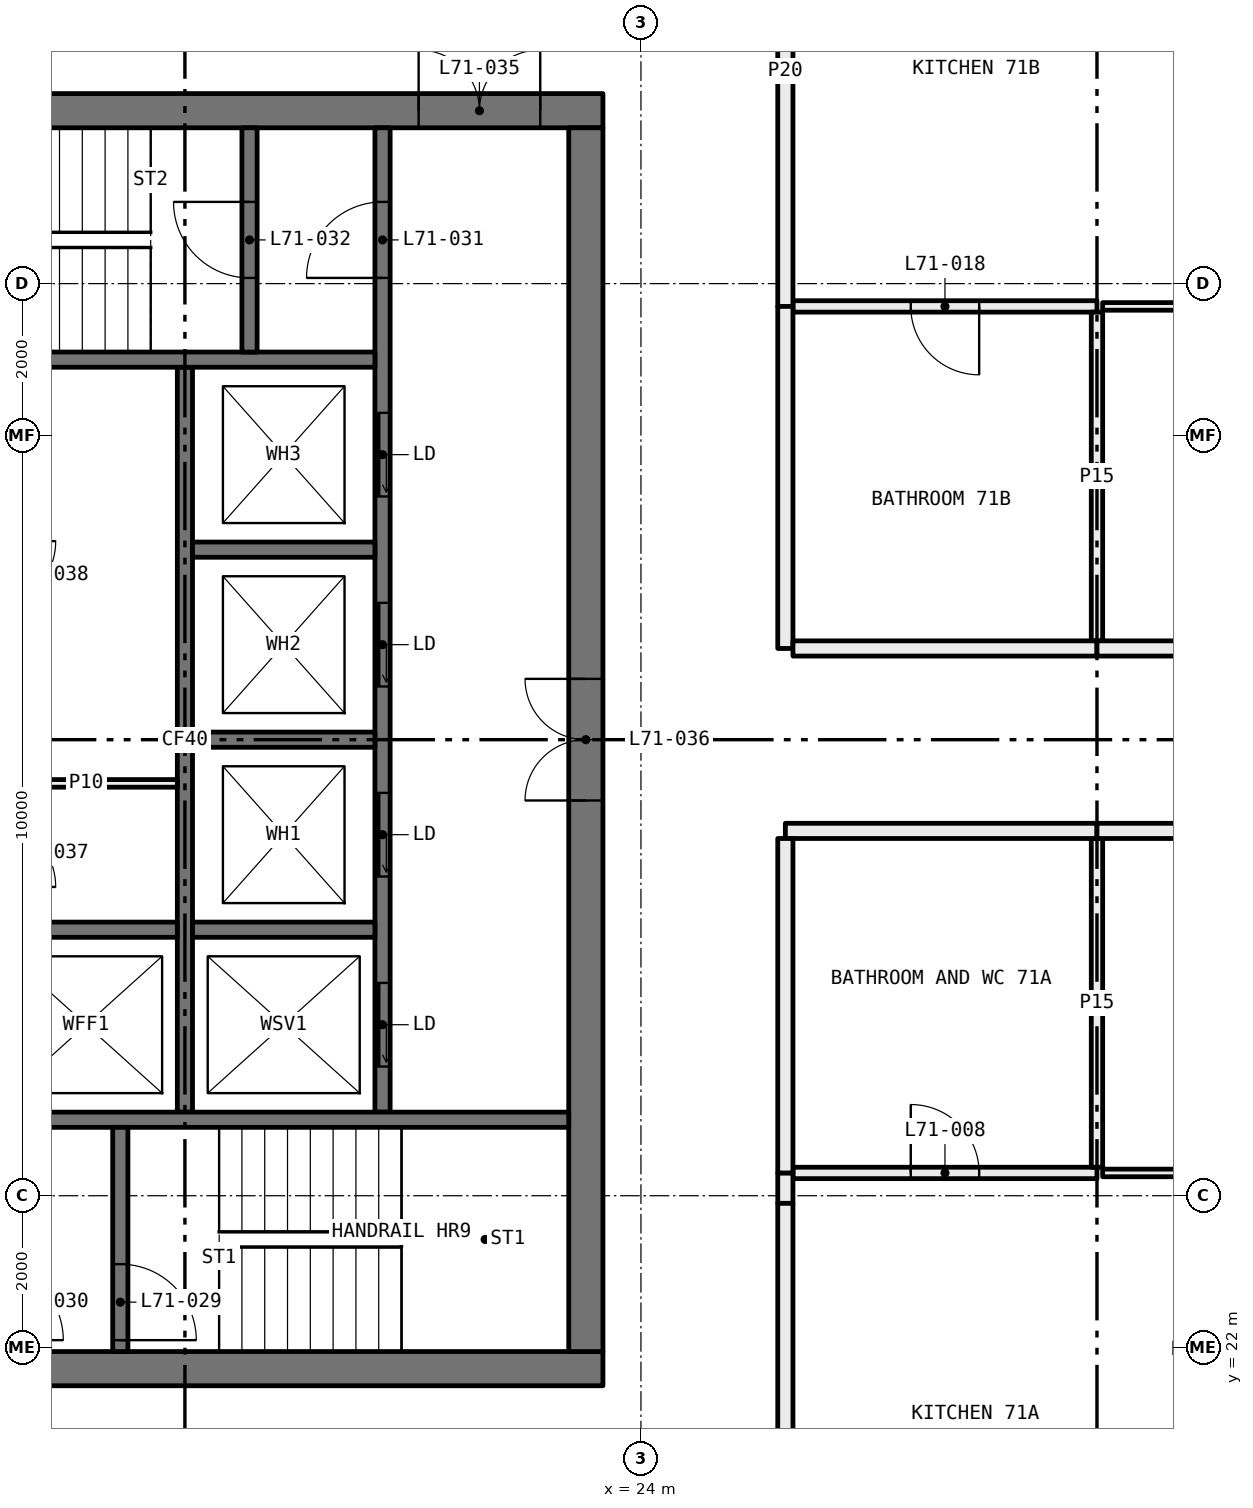
"""IFC4 building model, lengths in metres.
Left out: names, types, materials, properties, quantities, classifications, styles, units other than length and angle.
Written with IfcOpenShell. Run it as: python <this file> out.ifc"""

import sys

from ifc_helpers import new_model, si_unit, direction, frame, frame_2d, origin, place, context, subcontext, project, spatial, rectangle, extrude, element, fill, save


model = new_model("IFC4")
c1 = context("Model", 3, precision=1e-05, world=origin(), true_north=direction((0.0, 1.0)))
c2 = subcontext(c1, "Body", "Model", "MODEL_VIEW")
j1 = project(units=[si_unit("LENGTHUNIT", "METRE"), si_unit("PLANEANGLEUNIT", "RADIAN")], contexts=[c1])
p1 = place(None, origin())
s1 = spatial("IfcSite", under=j1, at=p1, CompositionType="ELEMENT")
p2 = place(p1, origin())
s2 = spatial("IfcBuilding", under=s1, at=p2, CompositionType="ELEMENT")
p3 = place(p2, frame((0.0, 0.0, 262.8)))
s3 = spatial("IfcBuildingStorey", under=s2, at=p3, CompositionType="ELEMENT", Elevation=262.8)
p4 = place(p3, frame((30.0, 24.3, 0.0), z_axis=(0.0, 0.0, 1.0), x_axis=(-1.0, 0.0, 0.0)))
e1 = element("IfcWall", 1, at=p4, inside=s3, PredefinedType="PARTITIONING", context=c2, shape_type="SweptSolid", body=[
    extrude(rectangle(XDim=4.0, YDim=0.15, at=frame_2d((2.0, 0.0))), origin(), (0.0, 0.0, 1.0), 3.05),
])
p5 = place(p4, frame((1.55, 0.0, 0.0)))
e2 = element("IfcOpeningElement", 2, at=p5, cuts=e1, PredefinedType="OPENING", context=c2, shape_type="SweptSolid", body=[
    extrude(rectangle(XDim=0.9, YDim=2.1, at=frame_2d((0.45, 1.05))), frame((0.0, 0.085, 0.0), z_axis=(0.0, -1.0, 0.0), x_axis=(1.0, 0.0, 0.0)), (0.0, 0.0, 1.0), 0.17),
])
p6 = place(p3, frame((31.45, 24.3, 0.0), z_axis=(0.0, 0.0, 1.0), x_axis=(-1.0, 0.0, 0.0)))
e3 = element("IfcWall", 3, at=p6, inside=s3, PredefinedType="PARTITIONING", context=c2, shape_type="SweptSolid", body=[
    extrude(rectangle(XDim=1.375, YDim=0.1, at=frame_2d((0.688, 0.0))), origin(), (0.0, 0.0, 1.0), 3.05),
])
p7 = place(p3, frame((25.9, 24.3, 0.0), z_axis=(0.0, 0.0, 1.0), x_axis=(0.0, -1.0, 0.0)))
e4 = element("IfcWall", 4, at=p7, inside=s3, PredefinedType="PARTITIONING", context=c2, shape_type="SweptSolid", body=[
    extrude(rectangle(XDim=0.4, YDim=0.2, at=frame_2d((0.2, 0.0))), origin(), (0.0, 0.0, 1.0), 2.45),
])
p8 = place(p3, frame((25.9, 23.9, 0.0), z_axis=(0.0, 0.0, 1.0), x_axis=(0.0, -1.0, 0.0)))
e5 = element("IfcWall", 5, at=p8, inside=s3, PredefinedType="PARTITIONING", context=c2, shape_type="SweptSolid", body=[
    extrude(rectangle(XDim=5.8, YDim=0.2, at=frame_2d((2.9, 0.0))), origin(), (0.0, 0.0, 1.0), 3.05),
])
p9 = place(p3, frame((30.0, 24.375, 0.0), z_axis=(0.0, 0.0, 1.0), x_axis=(0.0, 1.0, 0.0)))
e6 = element("IfcWall", 6, at=p9, inside=s3, PredefinedType="PARTITIONING", context=c2, shape_type="SweptSolid", body=[
    extrude(rectangle(XDim=4.325, YDim=0.15, at=frame_2d((2.163, 0.0))), origin(), (0.0, 0.0, 1.0), 3.05),
])
p10 = place(p3, frame((30.0, 28.8, 0.0), z_axis=(0.0, 0.0, 1.0), x_axis=(-1.0, 0.0, 0.0)))
e7 = element("IfcWall", 7, at=p10, inside=s3, PredefinedType="PARTITIONING", context=c2, shape_type="SweptSolid", body=[
    extrude(rectangle(XDim=4.1, YDim=0.2, at=frame_2d((2.05, 0.0))), origin(), (0.0, 0.0, 1.0), 3.05),
])
p11 = place(p3, frame((25.9, 28.7, 0.0), z_axis=(0.0, 0.0, 1.0), x_axis=(0.0, -1.0, 0.0)))
e8 = element("IfcWall", 8, at=p11, inside=s3, PredefinedType="PARTITIONING", context=c2, shape_type="SweptSolid", body=[
    extrude(rectangle(XDim=4.4, YDim=0.2, at=frame_2d((2.2, 0.0))), origin(), (0.0, 0.0, 1.0), 3.05),
])
p12 = place(p3, frame((35.9, 28.8, 0.0), z_axis=(0.0, 0.0, 1.0), x_axis=(-1.0, 0.0, 0.0)))
e9 = element("IfcWall", 9, at=p12, inside=s3, PredefinedType="PARTITIONING", context=c2, shape_type="SweptSolid", body=[
    extrude(rectangle(XDim=5.9, YDim=0.2, at=frame_2d((2.95, 0.0))), origin(), (0.0, 0.0, 1.0), 3.05),
])
p13 = place(p3, frame((26.0, 35.7, 0.0), z_axis=(0.0, 0.0, 1.0), x_axis=(1.0, 0.0, 0.0)))
e10 = element("IfcWall", 10, at=p13, inside=s3, PredefinedType="PARTITIONING", context=c2, shape_type="SweptSolid", body=[
    extrude(rectangle(XDim=4.0, YDim=0.15, at=frame_2d((2.0, 0.0))), origin(), (0.0, 0.0, 1.0), 3.05),
])
p14 = place(p13, frame((1.55, 0.0, 0.0)))
e11 = element("IfcOpeningElement", 11, at=p14, cuts=e10, PredefinedType="OPENING", context=c2, shape_type="SweptSolid", body=[
    extrude(rectangle(XDim=0.9, YDim=2.1, at=frame_2d((0.45, 1.05))), frame((0.0, 0.085, 0.0), z_axis=(0.0, -1.0, 0.0), x_axis=(1.0, 0.0, 0.0)), (0.0, 0.0, 1.0), 0.17),
])
p15 = place(p3, frame((30.075, 35.7, 0.0), z_axis=(0.0, 0.0, 1.0), x_axis=(1.0, 0.0, 0.0)))
e12 = element("IfcWall", 12, at=p15, inside=s3, PredefinedType="PARTITIONING", context=c2, shape_type="SweptSolid", body=[
    extrude(rectangle(XDim=1.375, YDim=0.1, at=frame_2d((0.688, 0.0))), origin(), (0.0, 0.0, 1.0), 3.05),
])
p16 = place(p3, frame((25.9, 41.9, 0.0), z_axis=(0.0, 0.0, 1.0), x_axis=(0.0, -1.0, 0.0)))
e13 = element("IfcWall", 13, at=p16, inside=s3, PredefinedType="PARTITIONING", context=c2, shape_type="SweptSolid", body=[
    extrude(rectangle(XDim=6.2, YDim=0.2, at=frame_2d((3.1, 0.0))), origin(), (0.0, 0.0, 1.0), 2.45),
])
p17 = place(p3, frame((30.0, 31.3, 0.0), z_axis=(0.0, 0.0, 1.0), x_axis=(0.0, 1.0, 0.0)))
e14 = element("IfcWall", 14, at=p17, inside=s3, PredefinedType="PARTITIONING", context=c2, shape_type="SweptSolid", body=[
    extrude(rectangle(XDim=4.325, YDim=0.15, at=frame_2d((2.163, 0.0))), origin(), (0.0, 0.0, 1.0), 3.05),
])
p18 = place(p3, frame((25.9, 35.7, 0.0), z_axis=(0.0, 0.0, 1.0), x_axis=(0.0, -1.0, 0.0)))
e15 = element("IfcWall", 15, at=p18, inside=s3, PredefinedType="PARTITIONING", context=c2, shape_type="SweptSolid", body=[
    extrude(rectangle(XDim=4.5, YDim=0.2, at=frame_2d((2.25, 0.0))), origin(), (0.0, 0.0, 1.0), 3.05),
])
p19 = place(p3, frame((26.0, 31.2, 0.0), z_axis=(0.0, 0.0, 1.0), x_axis=(1.0, 0.0, 0.0)))
e16 = element("IfcWall", 16, at=p19, inside=s3, PredefinedType="PARTITIONING", context=c2, shape_type="SweptSolid", body=[
    extrude(rectangle(XDim=4.0, YDim=0.2, at=frame_2d((2.0, 0.0))), origin(), (0.0, 0.0, 1.0), 3.05),
])
p20 = place(p3, frame((30.0, 31.2, 0.0), z_axis=(0.0, 0.0, 1.0), x_axis=(1.0, 0.0, 0.0)))
e17 = element("IfcWall", 17, at=p20, inside=s3, PredefinedType="PARTITIONING", context=c2, shape_type="SweptSolid", body=[
    extrude(rectangle(XDim=6.1, YDim=0.2, at=frame_2d((3.05, 0.0))), origin(), (0.0, 0.0, 1.0), 2.45),
])
p21 = place(p3, frame((12.5, 21.725, 0.0), z_axis=(0.0, 0.0, 1.0), x_axis=(1.0, 0.0, 0.0)))
e18 = element("IfcWall", 18, at=p21, inside=s3, PredefinedType="SHEAR", context=c2, shape_type="SweptSolid", body=[
    extrude(rectangle(XDim=11.0, YDim=0.45, at=frame_2d((5.5, 0.0))), origin(), (0.0, 0.0, 1.0), 3.05),
])
p22 = place(p21, frame((1.125, 0.0, 0.0)))
e19 = element("IfcOpeningElement", 19, at=p22, cuts=e18, PredefinedType="OPENING", context=c2, shape_type="SweptSolid", body=[
    extrude(rectangle(XDim=1.0, YDim=2.1, at=frame_2d((0.5, 1.05))), frame((0.0, 0.235, 0.0), z_axis=(0.0, -1.0, 0.0), x_axis=(1.0, 0.0, 0.0)), (0.0, 0.0, 1.0), 0.47),
])
p23 = place(p3, frame((12.5, 38.275, 0.0), z_axis=(0.0, 0.0, 1.0), x_axis=(1.0, 0.0, 0.0)))
e20 = element("IfcWall", 20, at=p23, inside=s3, PredefinedType="SHEAR", context=c2, shape_type="SweptSolid", body=[
    extrude(rectangle(XDim=11.0, YDim=0.45, at=frame_2d((5.5, 0.0))), origin(), (0.0, 0.0, 1.0), 3.05),
])
p24 = place(p23, frame((8.575, 0.0, 0.0)))
e21 = element("IfcOpeningElement", 21, at=p24, cuts=e20, PredefinedType="OPENING", context=c2, shape_type="SweptSolid", body=[
    extrude(rectangle(XDim=1.6, YDim=2.1, at=frame_2d((0.8, 1.05))), frame((0.0, 0.235, 0.0), z_axis=(0.0, -1.0, 0.0), x_axis=(1.0, 0.0, 0.0)), (0.0, 0.0, 1.0), 0.47),
])
p25 = place(p3, frame((23.275, 21.95, 0.0), z_axis=(0.0, 0.0, 1.0), x_axis=(0.0, 1.0, 0.0)))
e22 = element("IfcWall", 22, at=p25, inside=s3, PredefinedType="SHEAR", context=c2, shape_type="SweptSolid", body=[
    extrude(rectangle(XDim=16.1, YDim=0.45, at=frame_2d((8.05, 0.0))), origin(), (0.0, 0.0, 1.0), 3.05),
])
p26 = place(p25, frame((7.25, 0.0, 0.0)))
e23 = element("IfcOpeningElement", 23, at=p26, cuts=e22, PredefinedType="OPENING", context=c2, shape_type="SweptSolid", body=[
    extrude(rectangle(XDim=1.6, YDim=2.1, at=frame_2d((0.8, 1.05))), frame((0.0, 0.235, 0.0), z_axis=(0.0, -1.0, 0.0), x_axis=(1.0, 0.0, 0.0)), (0.0, 0.0, 1.0), 0.47),
])
p27 = place(p3, frame((20.6, 25.1, 0.0), z_axis=(0.0, 0.0, 1.0), x_axis=(0.0, 1.0, 0.0)))
e24 = element("IfcWall", 24, at=p27, inside=s3, PredefinedType="SOLIDWALL", context=c2, shape_type="SweptSolid", body=[
    extrude(rectangle(XDim=12.95, YDim=0.2, at=frame_2d((6.475, 0.0))), origin(), (0.0, 0.0, 1.0), 3.05),
])
p28 = place(p27, frame((0.6, 0.0, 0.0)))
e25 = element("IfcOpeningElement", 25, at=p28, cuts=e24, PredefinedType="OPENING", context=c2, shape_type="SweptSolid", body=[
    extrude(rectangle(XDim=1.1, YDim=2.1, at=frame_2d((0.55, 1.05))), frame((0.0, 0.11, 0.0), z_axis=(0.0, -1.0, 0.0), x_axis=(1.0, 0.0, 0.0)), (0.0, 0.0, 1.0), 0.22),
])
p29 = place(p27, frame((3.1, 0.0, 0.0)))
e26 = element("IfcOpeningElement", 26, at=p29, cuts=e24, PredefinedType="OPENING", context=c2, shape_type="SweptSolid", body=[
    extrude(rectangle(XDim=1.1, YDim=2.1, at=frame_2d((0.55, 1.05))), frame((0.0, 0.11, 0.0), z_axis=(0.0, -1.0, 0.0), x_axis=(1.0, 0.0, 0.0)), (0.0, 0.0, 1.0), 0.22),
])
p30 = place(p27, frame((5.6, 0.0, 0.0)))
e27 = element("IfcOpeningElement", 27, at=p30, cuts=e24, PredefinedType="OPENING", context=c2, shape_type="SweptSolid", body=[
    extrude(rectangle(XDim=1.1, YDim=2.1, at=frame_2d((0.55, 1.05))), frame((0.0, 0.11, 0.0), z_axis=(0.0, -1.0, 0.0), x_axis=(1.0, 0.0, 0.0)), (0.0, 0.0, 1.0), 0.22),
])
p31 = place(p27, frame((8.1, 0.0, 0.0)))
e28 = element("IfcOpeningElement", 28, at=p31, cuts=e24, PredefinedType="OPENING", context=c2, shape_type="SweptSolid", body=[
    extrude(rectangle(XDim=1.1, YDim=2.1, at=frame_2d((0.55, 1.05))), frame((0.0, 0.11, 0.0), z_axis=(0.0, -1.0, 0.0), x_axis=(1.0, 0.0, 0.0)), (0.0, 0.0, 1.0), 0.22),
])
p32 = place(p27, frame((10.975, 0.0, 0.0)))
e29 = element("IfcOpeningElement", 29, at=p32, cuts=e24, PredefinedType="OPENING", context=c2, shape_type="SweptSolid", body=[
    extrude(rectangle(XDim=1.0, YDim=2.1, at=frame_2d((0.5, 1.05))), frame((0.0, 0.11, 0.0), z_axis=(0.0, -1.0, 0.0), x_axis=(1.0, 0.0, 0.0)), (0.0, 0.0, 1.0), 0.22),
])
p33 = place(p3, frame((18.0, 25.1, 0.0), z_axis=(0.0, 0.0, 1.0), x_axis=(0.0, 1.0, 0.0)))
e30 = element("IfcWall", 30, at=p33, inside=s3, PredefinedType="SOLIDWALL", context=c2, shape_type="SweptSolid", body=[
    extrude(rectangle(XDim=9.8, YDim=0.2, at=frame_2d((4.9, 0.0))), origin(), (0.0, 0.0, 1.0), 3.05),
])
for number, where, z_axis, x_axis in (
    (31, (15.5, 25.0, 0.0), (0.0, 0.0, 1.0), (1.0, 0.0, 0.0)),
    (32, (12.95, 35.0, 0.0), (0.0, 0.0, 1.0), (1.0, 0.0, 0.0)),
):
    element("IfcWall", number, at=place(p3, frame(where, z_axis=z_axis, x_axis=x_axis)), inside=s3, PredefinedType="SOLIDWALL", context=c2, shape_type="SweptSolid", body=[
        extrude(rectangle(XDim=7.55, YDim=0.2, at=frame_2d((3.775, 0.0))), origin(), (0.0, 0.0, 1.0), 3.05),
    ])
p34 = place(p3, frame((17.15, 21.95, 0.0), z_axis=(0.0, 0.0, 1.0), x_axis=(0.0, 1.0, 0.0)))
e33 = element("IfcWall", 33, at=p34, inside=s3, PredefinedType="SOLIDWALL", context=c2, shape_type="SweptSolid", body=[
    extrude(rectangle(XDim=2.95, YDim=0.2, at=frame_2d((1.475, 0.0))), origin(), (0.0, 0.0, 1.0), 3.05),
])
p35 = place(p34, frame((0.15, 0.0, 0.0)))
e34 = element("IfcOpeningElement", 34, at=p35, cuts=e33, PredefinedType="OPENING", context=c2, shape_type="SweptSolid", body=[
    extrude(rectangle(XDim=1.0, YDim=2.1, at=frame_2d((0.5, 1.05))), frame((0.0, 0.11, 0.0), z_axis=(0.0, -1.0, 0.0), x_axis=(1.0, 0.0, 0.0)), (0.0, 0.0, 1.0), 0.22),
])
p36 = place(p3, frame((18.85, 35.1, 0.0), z_axis=(0.0, 0.0, 1.0), x_axis=(0.0, 1.0, 0.0)))
e35 = element("IfcWall", 35, at=p36, inside=s3, PredefinedType="SOLIDWALL", context=c2, shape_type="SweptSolid", body=[
    extrude(rectangle(XDim=2.95, YDim=0.2, at=frame_2d((1.475, 0.0))), origin(), (0.0, 0.0, 1.0), 3.05),
])
p37 = place(p36, frame((0.975, 0.0, 0.0)))
e36 = element("IfcOpeningElement", 36, at=p37, cuts=e35, PredefinedType="OPENING", context=c2, shape_type="SweptSolid", body=[
    extrude(rectangle(XDim=1.0, YDim=2.1, at=frame_2d((0.5, 1.05))), frame((0.0, 0.11, 0.0), z_axis=(0.0, -1.0, 0.0), x_axis=(1.0, 0.0, 0.0)), (0.0, 0.0, 1.0), 0.22),
])
for number, where, z_axis, x_axis in (
    (37, (15.5, 27.5, 0.0), (0.0, 0.0, 1.0), (1.0, 0.0, 0.0)),
    (38, (18.1, 27.5, 0.0), (0.0, 0.0, 1.0), (1.0, 0.0, 0.0)),
    (39, (18.1, 30.0, 0.0), (0.0, 0.0, 1.0), (1.0, 0.0, 0.0)),
    (40, (18.1, 32.5, 0.0), (0.0, 0.0, 1.0), (1.0, 0.0, 0.0)),
):
    element("IfcWall", number, at=place(p3, frame(where, z_axis=z_axis, x_axis=x_axis)), inside=s3, PredefinedType="SOLIDWALL", context=c2, shape_type="SweptSolid", body=[
        extrude(rectangle(XDim=2.4, YDim=0.2, at=frame_2d((1.2, 0.0))), origin(), (0.0, 0.0, 1.0), 3.05),
    ])
p38 = place(p3, frame((15.5, 29.425, 0.0), z_axis=(0.0, 0.0, 1.0), x_axis=(1.0, 0.0, 0.0)))
e41 = element("IfcWall", 41, at=p38, inside=s3, PredefinedType="PARTITIONING", context=c2, shape_type="SweptSolid", body=[
    extrude(rectangle(XDim=2.4, YDim=0.1, at=frame_2d((1.2, 0.0))), origin(), (0.0, 0.0, 1.0), 3.05),
])
p39 = place(p5, frame((0.9, 0.0, 0.0), x_axis=(-1.0, 0.0, 0.0)))
e42 = element("IfcDoor", 42, at=p39, inside=s3, OperationType="SINGLE_SWING_RIGHT", PredefinedType="DOOR", context=c2, shape_type="SweptSolid", body=[
    extrude(rectangle(XDim=0.9, YDim=2.1, at=frame_2d((0.45, 1.05))), frame((0.0, 0.025, 0.0), z_axis=(0.0, -1.0, 0.0), x_axis=(1.0, 0.0, 0.0)), (0.0, 0.0, 1.0), 0.05),
])
fill(e2, e42)
p40 = place(p14, frame((0.9, 0.0, 0.0), x_axis=(-1.0, 0.0, 0.0)))
e43 = element("IfcDoor", 43, at=p40, inside=s3, OperationType="SINGLE_SWING_RIGHT", PredefinedType="DOOR", context=c2, shape_type="SweptSolid", body=[
    extrude(rectangle(XDim=0.9, YDim=2.1, at=frame_2d((0.45, 1.05))), frame((0.0, 0.025, 0.0), z_axis=(0.0, -1.0, 0.0), x_axis=(1.0, 0.0, 0.0)), (0.0, 0.0, 1.0), 0.05),
])
fill(e11, e43)
p41 = place(p28, origin())
e44 = element("IfcDoor", 44, at=p41, inside=s3, OperationType="SLIDING_TO_LEFT", PredefinedType="DOOR", context=c2, shape_type="SweptSolid", body=[
    extrude(rectangle(XDim=1.1, YDim=2.1, at=frame_2d((0.55, 1.05))), frame((0.0, 0.025, 0.0), z_axis=(0.0, -1.0, 0.0), x_axis=(1.0, 0.0, 0.0)), (0.0, 0.0, 1.0), 0.05),
])
fill(e25, e44)
p42 = place(p29, origin())
e45 = element("IfcDoor", 45, at=p42, inside=s3, OperationType="SLIDING_TO_LEFT", PredefinedType="DOOR", context=c2, shape_type="SweptSolid", body=[
    extrude(rectangle(XDim=1.1, YDim=2.1, at=frame_2d((0.55, 1.05))), frame((0.0, 0.025, 0.0), z_axis=(0.0, -1.0, 0.0), x_axis=(1.0, 0.0, 0.0)), (0.0, 0.0, 1.0), 0.05),
])
fill(e26, e45)
p43 = place(p30, origin())
e46 = element("IfcDoor", 46, at=p43, inside=s3, OperationType="SLIDING_TO_LEFT", PredefinedType="DOOR", context=c2, shape_type="SweptSolid", body=[
    extrude(rectangle(XDim=1.1, YDim=2.1, at=frame_2d((0.55, 1.05))), frame((0.0, 0.025, 0.0), z_axis=(0.0, -1.0, 0.0), x_axis=(1.0, 0.0, 0.0)), (0.0, 0.0, 1.0), 0.05),
])
fill(e27, e46)
p44 = place(p31, origin())
e47 = element("IfcDoor", 47, at=p44, inside=s3, OperationType="SLIDING_TO_LEFT", PredefinedType="DOOR", context=c2, shape_type="SweptSolid", body=[
    extrude(rectangle(XDim=1.1, YDim=2.1, at=frame_2d((0.55, 1.05))), frame((0.0, 0.025, 0.0), z_axis=(0.0, -1.0, 0.0), x_axis=(1.0, 0.0, 0.0)), (0.0, 0.0, 1.0), 0.05),
])
fill(e28, e47)
p45 = place(p35, frame((1.0, 0.0, 0.0), x_axis=(-1.0, 0.0, 0.0)))
e48 = element("IfcDoor", 48, at=p45, inside=s3, OperationType="SINGLE_SWING_LEFT", PredefinedType="DOOR", context=c2, shape_type="SweptSolid", body=[
    extrude(rectangle(XDim=1.0, YDim=2.1, at=frame_2d((0.5, 1.05))), frame((0.0, 0.025, 0.0), z_axis=(0.0, -1.0, 0.0), x_axis=(1.0, 0.0, 0.0)), (0.0, 0.0, 1.0), 0.05),
])
fill(e34, e48)
p46 = place(p32, origin())
e49 = element("IfcDoor", 49, at=p46, inside=s3, OperationType="SINGLE_SWING_RIGHT", PredefinedType="DOOR", context=c2, shape_type="SweptSolid", body=[
    extrude(rectangle(XDim=1.0, YDim=2.1, at=frame_2d((0.5, 1.05))), frame((0.0, 0.025, 0.0), z_axis=(0.0, -1.0, 0.0), x_axis=(1.0, 0.0, 0.0)), (0.0, 0.0, 1.0), 0.05),
])
fill(e29, e49)
p47 = place(p37, origin())
e50 = element("IfcDoor", 50, at=p47, inside=s3, OperationType="SINGLE_SWING_LEFT", PredefinedType="DOOR", context=c2, shape_type="SweptSolid", body=[
    extrude(rectangle(XDim=1.0, YDim=2.1, at=frame_2d((0.5, 1.05))), frame((0.0, 0.025, 0.0), z_axis=(0.0, -1.0, 0.0), x_axis=(1.0, 0.0, 0.0)), (0.0, 0.0, 1.0), 0.05),
])
fill(e36, e50)
p48 = place(p24, origin())
e51 = element("IfcDoor", 51, at=p48, inside=s3, OperationType="DOUBLE_DOOR_SINGLE_SWING", PredefinedType="DOOR", context=c2, shape_type="SweptSolid", body=[
    extrude(rectangle(XDim=1.6, YDim=2.1, at=frame_2d((0.8, 1.05))), frame((0.0, 0.025, 0.0), z_axis=(0.0, -1.0, 0.0), x_axis=(1.0, 0.0, 0.0)), (0.0, 0.0, 1.0), 0.05),
])
fill(e21, e51)
p49 = place(p26, origin())
e52 = element("IfcDoor", 52, at=p49, inside=s3, OperationType="DOUBLE_DOOR_SINGLE_SWING", PredefinedType="DOOR", context=c2, shape_type="SweptSolid", body=[
    extrude(rectangle(XDim=1.6, YDim=2.1, at=frame_2d((0.8, 1.05))), frame((0.0, 0.025, 0.0), z_axis=(0.0, -1.0, 0.0), x_axis=(1.0, 0.0, 0.0)), (0.0, 0.0, 1.0), 0.05),
])
fill(e23, e52)
save(model, sys.argv[1])
